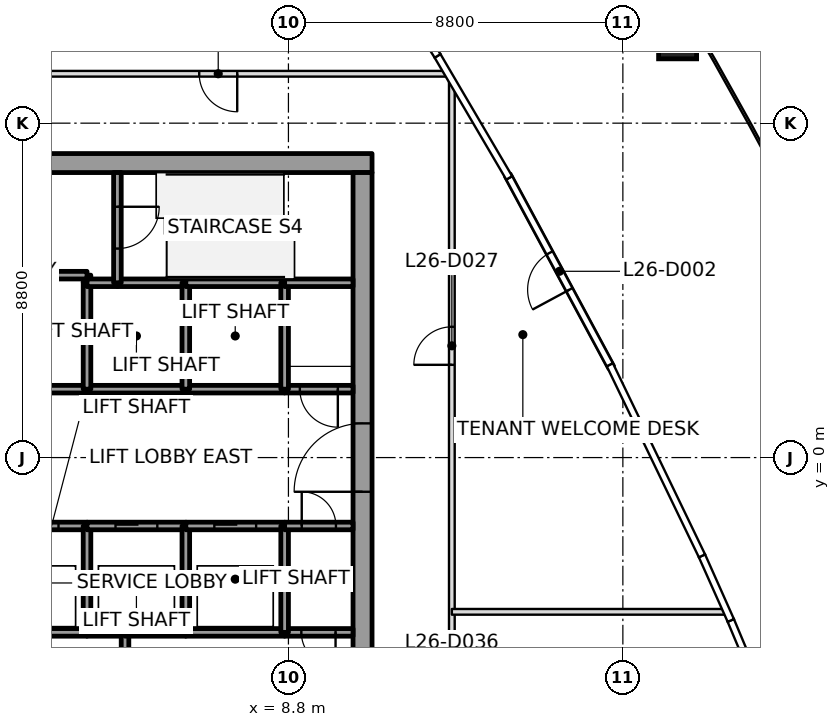
"""IFC4 building model, lengths in metres.
Left out: names, types, materials, properties, quantities, classifications, styles, units other than length and angle.
Written with IfcOpenShell. Run it as: python <this file> out.ifc"""

import sys

from ifc_helpers import new_model, si_unit, direction, frame, frame_2d, origin, origin_2d, place, context, subcontext, project, spatial, rectangle, extrude, clip, halfspace, element, fill, save


model = new_model("IFC4")
c1 = context("Model", 3, precision=1e-05, world=origin(), true_north=direction((0.0, 1.0)))
c2 = subcontext(c1, "Body", "Model", "MODEL_VIEW")
j1 = project(units=[si_unit("LENGTHUNIT", "METRE"), si_unit("PLANEANGLEUNIT", "RADIAN")], contexts=[c1])
p1 = place(None, origin())
s1 = spatial("IfcSite", under=j1, at=p1, CompositionType="ELEMENT")
p2 = place(p1, origin())
s2 = spatial("IfcBuilding", under=s1, at=p2, CompositionType="ELEMENT")
p3 = place(p2, frame((0.0, 0.0, 125.8)))
s3 = spatial("IfcBuildingStorey", under=s2, at=p3, CompositionType="ELEMENT", Elevation=125.8)
p4 = place(p3, frame((19.04, 10.993, 0.0), z_axis=(-0.009948074445, -0.005736926367, 0.999934059571), x_axis=(-0.499975258342, 0.8660396879, -5.385525e-06)))
e1 = element("IfcColumn", 1, at=p4, inside=s3, PredefinedType="COLUMN", context=c2, shape_type="SweptSolid", body=[
    clip(extrude(rectangle(XDim=1.0, YDim=1.0, at=origin_2d()), origin(), (0.0, 0.0, 1.0), 4.0), halfspace(frame((0.0, 0.0, 0.002)), True)),
])
p5 = place(p3, frame((-11.0, 7.75, 0.0), z_axis=(0.0, 0.0, 1.0), x_axis=(1.0, 0.0, 0.0)))
e2 = element("IfcWall", 2, at=p5, inside=s3, PredefinedType="SHEAR", context=c2, shape_type="SweptSolid", body=[
    extrude(rectangle(XDim=22.0, YDim=0.5, at=frame_2d((11.0, 0.0))), origin(), (0.0, 0.0, 1.0), 4.0),
])
p6 = place(p5, frame((10.45, 0.0, 0.0)))
e3 = element("IfcOpeningElement", 3, at=p6, cuts=e2, PredefinedType="OPENING", context=c2, shape_type="SweptSolid", body=[
    extrude(rectangle(XDim=1.1, YDim=2.1, at=frame_2d((0.55, 1.05))), frame((0.0, 0.25, 0.0), z_axis=(0.0, -1.0, 0.0), x_axis=(1.0, 0.0, 0.0)), (0.0, 0.0, 1.0), 0.5),
])
p7 = place(p3, frame((10.75, -7.5, 0.0), z_axis=(0.0, 0.0, 1.0), x_axis=(0.0, 1.0, 0.0)))
e4 = element("IfcWall", 4, at=p7, inside=s3, PredefinedType="SHEAR", context=c2, shape_type="SweptSolid", body=[
    extrude(rectangle(XDim=15.0, YDim=0.5, at=frame_2d((7.5, 0.0))), origin(), (0.0, 0.0, 1.0), 4.0),
])
p8 = place(p7, frame((6.6, 0.0, 0.0)))
e5 = element("IfcOpeningElement", 5, at=p8, cuts=e4, PredefinedType="OPENING", context=c2, shape_type="SweptSolid", body=[
    extrude(rectangle(XDim=1.8, YDim=2.1, at=frame_2d((0.9, 1.05))), frame((0.0, 0.25, 0.0), z_axis=(0.0, -1.0, 0.0), x_axis=(1.0, 0.0, 0.0)), (0.0, 0.0, 1.0), 0.5),
])
p9 = place(p3, frame((17.299, 2.364, 0.0), z_axis=(0.0, 0.0, 1.0), x_axis=(-0.4740669858, 0.88048878072, 0.0)))
e6 = element("IfcWall", 6, at=p9, inside=s3, PredefinedType="SOLIDWALL", context=c2, shape_type="SweptSolid", body=[
    extrude(rectangle(XDim=5.764, YDim=0.2, at=frame_2d((2.882, 0.0))), origin(), (0.0, 0.0, 1.0), 3.34),
])
p10 = place(p9, frame((2.332, 0.0, 0.0)))
e7 = element("IfcOpeningElement", 7, at=p10, cuts=e6, PredefinedType="OPENING", context=c2, shape_type="SweptSolid", body=[
    extrude(rectangle(XDim=1.1, YDim=2.1, at=frame_2d((0.55, 1.05))), frame((0.0, 0.1, 0.0), z_axis=(0.0, -1.0, 0.0), x_axis=(1.0, 0.0, 0.0)), (0.0, 0.0, 1.0), 0.2),
])
p11 = place(p3, frame((0.9, -1.8, 0.0), z_axis=(0.0, 0.0, 1.0), x_axis=(1.0, 0.0, 0.0)))
e8 = element("IfcWall", 8, at=p11, inside=s3, PredefinedType="SOLIDWALL", context=c2, shape_type="SweptSolid", body=[
    extrude(rectangle(XDim=2.6, YDim=0.2, at=frame_2d((1.3, 0.0))), origin(), (0.0, 0.0, 1.0), 3.85),
])
p12 = place(p11, frame((0.75, 0.0, 0.0)))
e9 = element("IfcOpeningElement", 9, at=p12, cuts=e8, PredefinedType="OPENING", context=c2, shape_type="SweptSolid", body=[
    extrude(rectangle(XDim=1.1, YDim=2.1, at=frame_2d((0.55, 1.05))), frame((0.0, 0.1, 0.0), z_axis=(0.0, -1.0, 0.0), x_axis=(1.0, 0.0, 0.0)), (0.0, 0.0, 1.0), 0.2),
])
p13 = place(p3, frame((3.5, 1.8, 0.0), z_axis=(0.0, 0.0, 1.0), x_axis=(-1.0, 0.0, 0.0)))
e10 = element("IfcWall", 10, at=p13, inside=s3, PredefinedType="SOLIDWALL", context=c2, shape_type="SweptSolid", body=[
    extrude(rectangle(XDim=2.6, YDim=0.2, at=frame_2d((1.3, 0.0))), origin(), (0.0, 0.0, 1.0), 3.85),
])
p14 = place(p3, frame((3.5, 4.6, 0.0), z_axis=(0.0, 0.0, 1.0), x_axis=(0.0, 1.0, 0.0)))
e11 = element("IfcWall", 11, at=p14, inside=s3, PredefinedType="SOLIDWALL", context=c2, shape_type="SweptSolid", body=[
    extrude(rectangle(XDim=0.2, YDim=0.2, at=frame_2d((0.1, 0.0))), origin(), (0.0, 0.0, 1.0), 3.85),
])
p15 = place(p3, frame((3.5, 4.8, 0.0), z_axis=(0.0, 0.0, 1.0), x_axis=(-1.0, 0.0, 0.0)))
e12 = element("IfcWall", 12, at=p15, inside=s3, PredefinedType="SOLIDWALL", context=c2, shape_type="SweptSolid", body=[
    extrude(rectangle(XDim=2.6, YDim=0.2, at=frame_2d((1.3, 0.0))), origin(), (0.0, 0.0, 1.0), 3.85),
])
p16 = place(p3, frame((3.5, -4.6, 0.0), z_axis=(0.0, 0.0, 1.0), x_axis=(-1.0, 0.0, 0.0)))
e13 = element("IfcWall", 13, at=p16, inside=s3, PredefinedType="SOLIDWALL", context=c2, shape_type="SweptSolid", body=[
    extrude(rectangle(XDim=1.9, YDim=0.2, at=frame_2d((0.95, 0.0))), origin(), (0.0, 0.0, 1.0), 3.85),
])
p17 = place(p3, frame((4.5, -4.6, 0.0), z_axis=(0.0, 0.0, 1.0), x_axis=(-1.0, 0.0, 0.0)))
e14 = element("IfcWall", 14, at=p17, inside=s3, PredefinedType="SOLIDWALL", context=c2, shape_type="SweptSolid", body=[
    extrude(rectangle(XDim=1.0, YDim=0.2, at=frame_2d((0.5, 0.0))), origin(), (0.0, 0.0, 1.0), 3.85),
])
p18 = place(p3, frame((3.5, -4.6, 0.0), z_axis=(0.0, 0.0, 1.0), x_axis=(0.0, 1.0, 0.0)))
e15 = element("IfcWall", 15, at=p18, inside=s3, PredefinedType="SOLIDWALL", context=c2, shape_type="SweptSolid", body=[
    extrude(rectangle(XDim=2.8, YDim=0.2, at=frame_2d((1.4, 0.0))), origin(), (0.0, 0.0, 1.0), 3.85),
])
p19 = place(p3, frame((3.5, -1.8, 0.0), z_axis=(0.0, 0.0, 1.0), x_axis=(1.0, 0.0, 0.0)))
e16 = element("IfcWall", 16, at=p19, inside=s3, PredefinedType="SOLIDWALL", context=c2, shape_type="SweptSolid", body=[
    extrude(rectangle(XDim=2.6, YDim=0.2, at=frame_2d((1.3, 0.0))), origin(), (0.0, 0.0, 1.0), 3.85),
])
p20 = place(p19, frame((0.75, 0.0, 0.0)))
e17 = element("IfcOpeningElement", 17, at=p20, cuts=e16, PredefinedType="OPENING", context=c2, shape_type="SweptSolid", body=[
    extrude(rectangle(XDim=1.1, YDim=2.1, at=frame_2d((0.55, 1.05))), frame((0.0, 0.1, 0.0), z_axis=(0.0, -1.0, 0.0), x_axis=(1.0, 0.0, 0.0)), (0.0, 0.0, 1.0), 0.2),
])
p21 = place(p3, frame((6.1, 1.8, 0.0), z_axis=(0.0, 0.0, 1.0), x_axis=(-1.0, 0.0, 0.0)))
e18 = element("IfcWall", 18, at=p21, inside=s3, PredefinedType="SOLIDWALL", context=c2, shape_type="SweptSolid", body=[
    extrude(rectangle(XDim=2.6, YDim=0.2, at=frame_2d((1.3, 0.0))), origin(), (0.0, 0.0, 1.0), 3.85),
])
p22 = place(p3, frame((3.5, 1.8, 0.0), z_axis=(0.0, 0.0, 1.0), x_axis=(0.0, 1.0, 0.0)))
e19 = element("IfcWall", 19, at=p22, inside=s3, PredefinedType="SOLIDWALL", context=c2, shape_type="SweptSolid", body=[
    extrude(rectangle(XDim=2.8, YDim=0.2, at=frame_2d((1.4, 0.0))), origin(), (0.0, 0.0, 1.0), 3.85),
])
p23 = place(p3, frame((4.3, 4.6, 0.0), z_axis=(0.0, 0.0, 1.0), x_axis=(-1.0, 0.0, 0.0)))
e20 = element("IfcWall", 20, at=p23, inside=s3, PredefinedType="SOLIDWALL", context=c2, shape_type="SweptSolid", body=[
    extrude(rectangle(XDim=0.8, YDim=0.2, at=frame_2d((0.4, 0.0))), origin(), (0.0, 0.0, 1.0), 3.85),
])
p24 = place(p3, frame((6.1, 4.6, 0.0), z_axis=(0.0, 0.0, 1.0), x_axis=(-1.0, 0.0, 0.0)))
e21 = element("IfcWall", 21, at=p24, inside=s3, PredefinedType="SOLIDWALL", context=c2, shape_type="SweptSolid", body=[
    extrude(rectangle(XDim=1.8, YDim=0.2, at=frame_2d((0.9, 0.0))), origin(), (0.0, 0.0, 1.0), 3.85),
])
p25 = place(p3, frame((4.3, 7.5, 0.0), z_axis=(0.0, 0.0, 1.0), x_axis=(0.0, -1.0, 0.0)))
e22 = element("IfcWall", 22, at=p25, inside=s3, PredefinedType="SOLIDWALL", context=c2, shape_type="SweptSolid", body=[
    extrude(rectangle(XDim=2.9, YDim=0.2, at=frame_2d((1.45, 0.0))), origin(), (0.0, 0.0, 1.0), 3.85),
])
p26 = place(p25, frame((0.9, 0.0, 0.0)))
e23 = element("IfcOpeningElement", 23, at=p26, cuts=e22, PredefinedType="OPENING", context=c2, shape_type="SweptSolid", body=[
    extrude(rectangle(XDim=1.1, YDim=2.1, at=frame_2d((0.55, 1.05))), frame((0.0, 0.1, 0.0), z_axis=(0.0, -1.0, 0.0), x_axis=(1.0, 0.0, 0.0)), (0.0, 0.0, 1.0), 0.2),
])
p27 = place(p3, frame((4.5, -4.6, 0.0), z_axis=(0.0, 0.0, 1.0), x_axis=(0.0, -1.0, 0.0)))
e24 = element("IfcWall", 24, at=p27, inside=s3, PredefinedType="SOLIDWALL", context=c2, shape_type="SweptSolid", body=[
    extrude(rectangle(XDim=1.45, YDim=0.2, at=frame_2d((0.725, 0.0))), origin(), (0.0, 0.0, 1.0), 3.85),
])
p28 = place(p3, frame((6.1, -4.6, 0.0), z_axis=(0.0, 0.0, 1.0), x_axis=(-1.0, 0.0, 0.0)))
e25 = element("IfcWall", 25, at=p28, inside=s3, PredefinedType="SOLIDWALL", context=c2, shape_type="SweptSolid", body=[
    extrude(rectangle(XDim=1.6, YDim=0.2, at=frame_2d((0.8, 0.0))), origin(), (0.0, 0.0, 1.0), 3.85),
])
p29 = place(p3, frame((8.7, -4.6, 0.0), z_axis=(0.0, 0.0, 1.0), x_axis=(-1.0, 0.0, 0.0)))
e26 = element("IfcWall", 26, at=p29, inside=s3, PredefinedType="SOLIDWALL", context=c2, shape_type="SweptSolid", body=[
    extrude(rectangle(XDim=2.6, YDim=0.2, at=frame_2d((1.3, 0.0))), origin(), (0.0, 0.0, 1.0), 3.85),
])
p30 = place(p3, frame((6.1, -4.6, 0.0), z_axis=(0.0, 0.0, 1.0), x_axis=(0.0, 1.0, 0.0)))
e27 = element("IfcWall", 27, at=p30, inside=s3, PredefinedType="SOLIDWALL", context=c2, shape_type="SweptSolid", body=[
    extrude(rectangle(XDim=2.8, YDim=0.2, at=frame_2d((1.4, 0.0))), origin(), (0.0, 0.0, 1.0), 3.85),
])
p31 = place(p3, frame((6.1, -1.8, 0.0), z_axis=(0.0, 0.0, 1.0), x_axis=(1.0, 0.0, 0.0)))
e28 = element("IfcWall", 28, at=p31, inside=s3, PredefinedType="SOLIDWALL", context=c2, shape_type="SweptSolid", body=[
    extrude(rectangle(XDim=2.6, YDim=0.2, at=frame_2d((1.3, 0.0))), origin(), (0.0, 0.0, 1.0), 3.85),
])
p32 = place(p31, frame((0.75, 0.0, 0.0)))
e29 = element("IfcOpeningElement", 29, at=p32, cuts=e28, PredefinedType="OPENING", context=c2, shape_type="SweptSolid", body=[
    extrude(rectangle(XDim=1.1, YDim=2.1, at=frame_2d((0.55, 1.05))), frame((0.0, 0.1, 0.0), z_axis=(0.0, -1.0, 0.0), x_axis=(1.0, 0.0, 0.0)), (0.0, 0.0, 1.0), 0.2),
])
p33 = place(p3, frame((8.7, 1.8, 0.0), z_axis=(0.0, 0.0, 1.0), x_axis=(-1.0, 0.0, 0.0)))
e30 = element("IfcWall", 30, at=p33, inside=s3, PredefinedType="SOLIDWALL", context=c2, shape_type="SweptSolid", body=[
    extrude(rectangle(XDim=2.6, YDim=0.2, at=frame_2d((1.3, 0.0))), origin(), (0.0, 0.0, 1.0), 3.85),
])
p34 = place(p3, frame((6.1, 1.8, 0.0), z_axis=(0.0, 0.0, 1.0), x_axis=(0.0, 1.0, 0.0)))
e31 = element("IfcWall", 31, at=p34, inside=s3, PredefinedType="SOLIDWALL", context=c2, shape_type="SweptSolid", body=[
    extrude(rectangle(XDim=2.8, YDim=0.2, at=frame_2d((1.4, 0.0))), origin(), (0.0, 0.0, 1.0), 3.85),
])
p35 = place(p3, frame((8.7, 4.6, 0.0), z_axis=(0.0, 0.0, 1.0), x_axis=(-1.0, 0.0, 0.0)))
e32 = element("IfcWall", 32, at=p35, inside=s3, PredefinedType="SOLIDWALL", context=c2, shape_type="SweptSolid", body=[
    extrude(rectangle(XDim=2.6, YDim=0.2, at=frame_2d((1.3, 0.0))), origin(), (0.0, 0.0, 1.0), 3.85),
])
p36 = place(p3, frame((10.5, -4.6, 0.0), z_axis=(0.0, 0.0, 1.0), x_axis=(-1.0, 0.0, 0.0)))
e33 = element("IfcWall", 33, at=p36, inside=s3, PredefinedType="SOLIDWALL", context=c2, shape_type="SweptSolid", body=[
    extrude(rectangle(XDim=1.8, YDim=0.2, at=frame_2d((0.9, 0.0))), origin(), (0.0, 0.0, 1.0), 3.85),
])
p37 = place(p36, frame((0.46, 0.0, 0.0)))
e34 = element("IfcOpeningElement", 34, at=p37, cuts=e33, PredefinedType="OPENING", context=c2, shape_type="SweptSolid", body=[
    extrude(rectangle(XDim=0.9, YDim=2.1, at=frame_2d((0.45, 1.05))), frame((0.0, 0.1, 0.0), z_axis=(0.0, -1.0, 0.0), x_axis=(1.0, 0.0, 0.0)), (0.0, 0.0, 1.0), 0.2),
])
p38 = place(p3, frame((8.7, -1.8, 0.0), z_axis=(0.0, 0.0, 1.0), x_axis=(0.0, -1.0, 0.0)))
e35 = element("IfcWall", 35, at=p38, inside=s3, PredefinedType="SOLIDWALL", context=c2, shape_type="SweptSolid", body=[
    extrude(rectangle(XDim=2.8, YDim=0.2, at=frame_2d((1.4, 0.0))), origin(), (0.0, 0.0, 1.0), 3.85),
])
p39 = place(p3, frame((8.7, -1.8, 0.0), z_axis=(0.0, 0.0, 1.0), x_axis=(1.0, 0.0, 0.0)))
e36 = element("IfcWall", 36, at=p39, inside=s3, PredefinedType="SOLIDWALL", context=c2, shape_type="SweptSolid", body=[
    extrude(rectangle(XDim=1.8, YDim=0.2, at=frame_2d((0.9, 0.0))), origin(), (0.0, 0.0, 1.0), 3.85),
])
p40 = place(p39, frame((0.45, 0.0, 0.0)))
e37 = element("IfcOpeningElement", 37, at=p40, cuts=e36, PredefinedType="OPENING", context=c2, shape_type="SweptSolid", body=[
    extrude(rectangle(XDim=0.9, YDim=2.1, at=frame_2d((0.45, 1.05))), frame((0.0, 0.1, 0.0), z_axis=(0.0, -1.0, 0.0), x_axis=(1.0, 0.0, 0.0)), (0.0, 0.0, 1.0), 0.2),
])
p41 = place(p3, frame((10.5, 1.8, 0.0), z_axis=(0.0, 0.0, 1.0), x_axis=(-1.0, 0.0, 0.0)))
e38 = element("IfcWall", 38, at=p41, inside=s3, PredefinedType="SOLIDWALL", context=c2, shape_type="SweptSolid", body=[
    extrude(rectangle(XDim=1.8, YDim=0.2, at=frame_2d((0.9, 0.0))), origin(), (0.0, 0.0, 1.0), 3.85),
])
p42 = place(p41, frame((0.4, 0.0, 0.0)))
e39 = element("IfcOpeningElement", 39, at=p42, cuts=e38, PredefinedType="OPENING", context=c2, shape_type="SweptSolid", body=[
    extrude(rectangle(XDim=1.0, YDim=2.1, at=frame_2d((0.5, 1.05))), frame((0.0, 0.1, 0.0), z_axis=(0.0, -1.0, 0.0), x_axis=(1.0, 0.0, 0.0)), (0.0, 0.0, 1.0), 0.2),
])
p43 = place(p3, frame((8.7, 4.6, 0.0), z_axis=(0.0, 0.0, 1.0), x_axis=(0.0, -1.0, 0.0)))
e40 = element("IfcWall", 40, at=p43, inside=s3, PredefinedType="SOLIDWALL", context=c2, shape_type="SweptSolid", body=[
    extrude(rectangle(XDim=2.8, YDim=0.2, at=frame_2d((1.4, 0.0))), origin(), (0.0, 0.0, 1.0), 3.85),
])
p44 = place(p3, frame((10.5, 4.6, 0.0), z_axis=(0.0, 0.0, 1.0), x_axis=(-1.0, 0.0, 0.0)))
e41 = element("IfcWall", 41, at=p44, inside=s3, PredefinedType="SOLIDWALL", context=c2, shape_type="SweptSolid", body=[
    extrude(rectangle(XDim=1.8, YDim=0.2, at=frame_2d((0.9, 0.0))), origin(), (0.0, 0.0, 1.0), 3.85),
])
p45 = place(p3, frame((20.339, -4.059, 0.0), z_axis=(0.0, 0.0, 1.0), x_axis=(-1.0, 0.0, 0.0)))
e42 = element("IfcWall", 42, at=p45, inside=s3, PredefinedType="PARTITIONING", context=c2, shape_type="SweptSolid", body=[
    extrude(rectangle(XDim=7.239, YDim=0.15, at=frame_2d((3.619, 0.0))), origin(), (0.0, 0.0, 1.0), 3.247),
])
p46 = place(p3, frame((13.005, 10.1, 0.0), z_axis=(0.0, 0.0, 1.0), x_axis=(-1.0, 0.0, 0.0)))
e43 = element("IfcWall", 43, at=p46, inside=s3, PredefinedType="PARTITIONING", context=c2, shape_type="SweptSolid", body=[
    extrude(rectangle(XDim=26.025, YDim=0.15, at=frame_2d((13.012, 0.0))), origin(), (0.0, 0.0, 1.0), 3.166),
])
p47 = place(p46, frame((5.552, 0.0, 0.0)))
e44 = element("IfcOpeningElement", 44, at=p47, cuts=e43, PredefinedType="OPENING", context=c2, shape_type="SweptSolid", body=[
    extrude(rectangle(XDim=1.0, YDim=2.1, at=frame_2d((0.5, 1.05))), frame((0.0, 0.075, 0.0), z_axis=(0.0, -1.0, 0.0), x_axis=(1.0, 0.0, 0.0)), (0.0, 0.0, 1.0), 0.15),
])
p48 = place(p46, frame((13.755, 0.0, 0.0)))
e45 = element("IfcOpeningElement", 45, at=p48, cuts=e43, PredefinedType="OPENING", context=c2, shape_type="SweptSolid", body=[
    extrude(rectangle(XDim=0.9, YDim=2.1, at=frame_2d((0.45, 1.05))), frame((0.0, 0.075, 0.0), z_axis=(0.0, -1.0, 0.0), x_axis=(1.0, 0.0, 0.0)), (0.0, 0.0, 1.0), 0.15),
])
p49 = place(p46, frame((20.765, 0.0, 0.0)))
e46 = element("IfcOpeningElement", 46, at=p49, cuts=e43, PredefinedType="OPENING", context=c2, shape_type="SweptSolid", body=[
    extrude(rectangle(XDim=1.0, YDim=2.1, at=frame_2d((0.5, 1.05))), frame((0.0, 0.075, 0.0), z_axis=(0.0, -1.0, 0.0), x_axis=(1.0, 0.0, 0.0)), (0.0, 0.0, 1.0), 0.15),
])
p50 = place(p3, frame((13.1, -10.02, 0.0), z_axis=(0.0, 0.0, 1.0), x_axis=(0.0, 1.0, 0.0)))
e47 = element("IfcWall", 47, at=p50, inside=s3, PredefinedType="PARTITIONING", context=c2, shape_type="SweptSolid", body=[
    extrude(rectangle(XDim=19.961, YDim=0.15, at=frame_2d((9.98, 0.0))), origin(), (0.0, 0.0, 1.0), 3.166),
])
p51 = place(p50, frame((12.461, 0.0, 0.0)))
e48 = element("IfcOpeningElement", 48, at=p51, cuts=e47, PredefinedType="OPENING", context=c2, shape_type="SweptSolid", body=[
    extrude(rectangle(XDim=1.0, YDim=2.1, at=frame_2d((0.5, 1.05))), frame((0.0, 0.075, 0.0), z_axis=(0.0, -1.0, 0.0), x_axis=(1.0, 0.0, 0.0)), (0.0, 0.0, 1.0), 0.15),
])
p52 = place(p50, frame((2.43, 0.0, 0.0)))
e49 = element("IfcOpeningElement", 49, at=p52, cuts=e47, PredefinedType="OPENING", context=c2, shape_type="SweptSolid", body=[
    extrude(rectangle(XDim=1.0, YDim=2.1, at=frame_2d((0.5, 1.05))), frame((0.0, 0.075, 0.0), z_axis=(0.0, -1.0, 0.0), x_axis=(1.0, 0.0, 0.0)), (0.0, 0.0, 1.0), 0.15),
])
p53 = place(p10, origin())
e50 = element("IfcDoor", 50, at=p53, inside=s3, OperationType="SINGLE_SWING_LEFT", PredefinedType="DOOR", context=c2, shape_type="SweptSolid", body=[
    extrude(rectangle(XDim=1.1, YDim=2.1, at=frame_2d((0.55, 1.05))), frame((0.0, 0.025, 0.0), z_axis=(0.0, -1.0, 0.0), x_axis=(1.0, 0.0, 0.0)), (0.0, 0.0, 1.0), 0.05),
])
fill(e7, e50)
p54 = place(p51, origin())
e51 = element("IfcDoor", 51, at=p54, inside=s3, OperationType="SINGLE_SWING_LEFT", PredefinedType="DOOR", context=c2, shape_type="SweptSolid", body=[
    extrude(rectangle(XDim=1.0, YDim=2.1, at=frame_2d((0.5, 1.05))), frame((0.0, 0.025, 0.0), z_axis=(0.0, -1.0, 0.0), x_axis=(1.0, 0.0, 0.0)), (0.0, 0.0, 1.0), 0.05),
])
fill(e48, e51)
p55 = place(p47, origin())
e52 = element("IfcDoor", 52, at=p55, inside=s3, OperationType="SINGLE_SWING_RIGHT", PredefinedType="DOOR", context=c2, shape_type="SweptSolid", body=[
    extrude(rectangle(XDim=1.0, YDim=2.1, at=frame_2d((0.5, 1.05))), frame((0.0, 0.025, 0.0), z_axis=(0.0, -1.0, 0.0), x_axis=(1.0, 0.0, 0.0)), (0.0, 0.0, 1.0), 0.05),
])
fill(e44, e52)
p56 = place(p12, origin())
e53 = element("IfcDoor", 53, at=p56, inside=s3, OperationType="SLIDING_TO_RIGHT", PredefinedType="DOOR", context=c2, shape_type="SweptSolid", body=[
    extrude(rectangle(XDim=1.1, YDim=2.1, at=frame_2d((0.55, 1.05))), frame((0.0, 0.025, 0.0), z_axis=(0.0, -1.0, 0.0), x_axis=(1.0, 0.0, 0.0)), (0.0, 0.0, 1.0), 0.05),
])
fill(e9, e53)
p57 = place(p20, origin())
e54 = element("IfcDoor", 54, at=p57, inside=s3, OperationType="SLIDING_TO_LEFT", PredefinedType="DOOR", context=c2, shape_type="SweptSolid", body=[
    extrude(rectangle(XDim=1.1, YDim=2.1, at=frame_2d((0.55, 1.05))), frame((0.0, 0.025, 0.0), z_axis=(0.0, -1.0, 0.0), x_axis=(1.0, 0.0, 0.0)), (0.0, 0.0, 1.0), 0.05),
])
fill(e17, e54)
p58 = place(p32, origin())
e55 = element("IfcDoor", 55, at=p58, inside=s3, OperationType="SLIDING_TO_RIGHT", PredefinedType="DOOR", context=c2, shape_type="SweptSolid", body=[
    extrude(rectangle(XDim=1.1, YDim=2.1, at=frame_2d((0.55, 1.05))), frame((0.0, 0.025, 0.0), z_axis=(0.0, -1.0, 0.0), x_axis=(1.0, 0.0, 0.0)), (0.0, 0.0, 1.0), 0.05),
])
fill(e29, e55)
p59 = place(p42, origin())
e56 = element("IfcDoor", 56, at=p59, inside=s3, OperationType="SINGLE_SWING_RIGHT", PredefinedType="DOOR", context=c2, shape_type="SweptSolid", body=[
    extrude(rectangle(XDim=1.0, YDim=2.1, at=frame_2d((0.5, 1.05))), frame((0.0, 0.025, 0.0), z_axis=(0.0, -1.0, 0.0), x_axis=(1.0, 0.0, 0.0)), (0.0, 0.0, 1.0), 0.05),
])
fill(e39, e56)
p60 = place(p26, origin())
e57 = element("IfcDoor", 57, at=p60, inside=s3, OperationType="SINGLE_SWING_LEFT", PredefinedType="DOOR", context=c2, shape_type="SweptSolid", body=[
    extrude(rectangle(XDim=1.1, YDim=2.1, at=frame_2d((0.55, 1.05))), frame((0.0, 0.025, 0.0), z_axis=(0.0, -1.0, 0.0), x_axis=(1.0, 0.0, 0.0)), (0.0, 0.0, 1.0), 0.05),
])
fill(e23, e57)
p61 = place(p37, origin())
e58 = element("IfcDoor", 58, at=p61, inside=s3, OperationType="SINGLE_SWING_RIGHT", PredefinedType="DOOR", context=c2, shape_type="SweptSolid", body=[
    extrude(rectangle(XDim=0.9, YDim=2.1, at=frame_2d((0.45, 1.05))), frame((0.0, 0.025, 0.0), z_axis=(0.0, -1.0, 0.0), x_axis=(1.0, 0.0, 0.0)), (0.0, 0.0, 1.0), 0.05),
])
fill(e34, e58)
p62 = place(p40, origin())
e59 = element("IfcDoor", 59, at=p62, inside=s3, OperationType="SINGLE_SWING_LEFT", PredefinedType="DOOR", context=c2, shape_type="SweptSolid", body=[
    extrude(rectangle(XDim=0.9, YDim=2.1, at=frame_2d((0.45, 1.05))), frame((0.0, 0.025, 0.0), z_axis=(0.0, -1.0, 0.0), x_axis=(1.0, 0.0, 0.0)), (0.0, 0.0, 1.0), 0.05),
])
fill(e37, e59)
p63 = place(p8, origin())
e60 = element("IfcDoor", 60, at=p63, inside=s3, OperationType="DOUBLE_DOOR_SINGLE_SWING", PredefinedType="DOOR", context=c2, shape_type="SweptSolid", body=[
    extrude(rectangle(XDim=1.8, YDim=2.1, at=frame_2d((0.9, 1.05))), frame((0.0, 0.025, 0.0), z_axis=(0.0, -1.0, 0.0), x_axis=(1.0, 0.0, 0.0)), (0.0, 0.0, 1.0), 0.05),
])
fill(e5, e60)
save(model, sys.argv[1])
